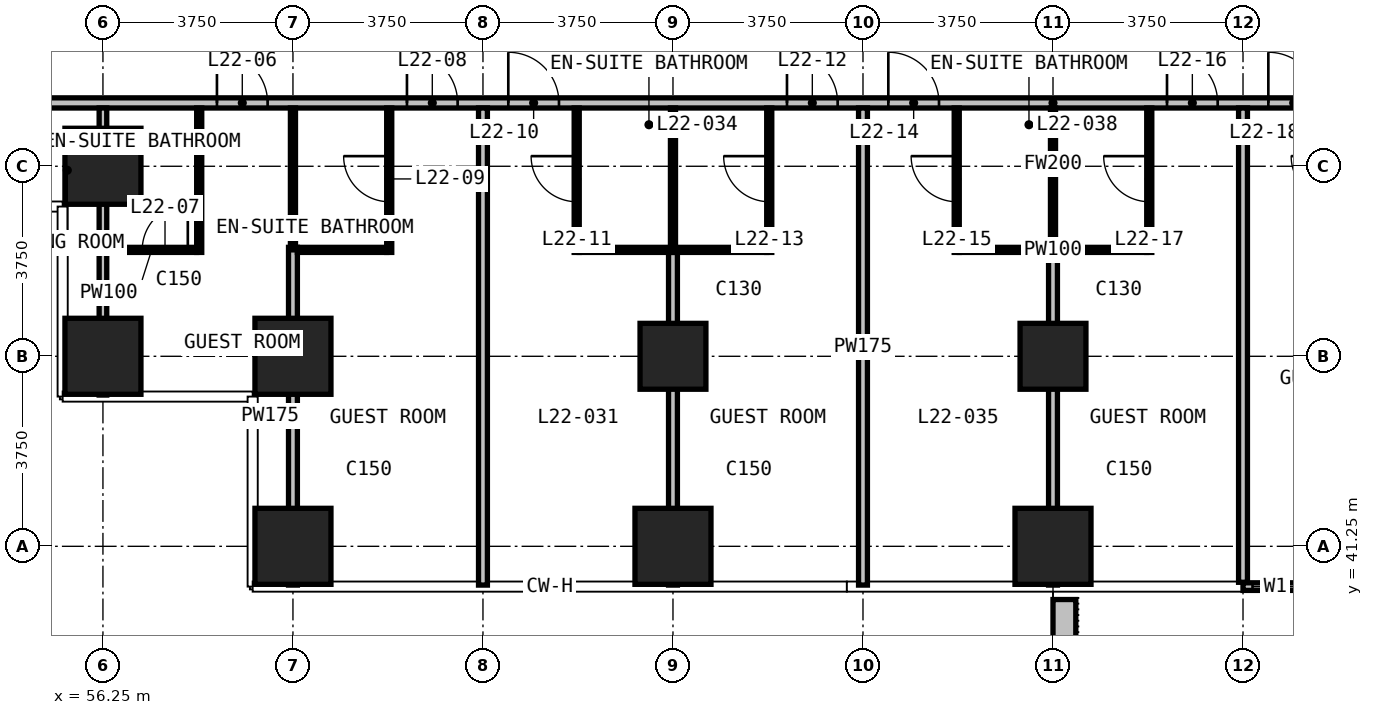
"""IFC4 building model, lengths in metres.
Left out: names, types, materials, properties, quantities, classifications, styles, units other than length and angle.
Written with IfcOpenShell. Run it as: python <this file> out.ifc"""

import sys

from ifc_helpers import new_model, si_unit, direction, frame, frame_2d, origin, origin_2d, place, context, subcontext, project, spatial, rectangle, extrude, element, fill, save


model = new_model("IFC4")
c1 = context("Model", 3, precision=1e-05, world=origin(), true_north=direction((0.0, 1.0)))
c2 = subcontext(c1, "Body", "Model", "MODEL_VIEW")
j1 = project(units=[si_unit("LENGTHUNIT", "METRE"), si_unit("PLANEANGLEUNIT", "RADIAN")], contexts=[c1])
p1 = place(None, origin())
s1 = spatial("IfcSite", under=j1, at=p1, CompositionType="ELEMENT")
p2 = place(p1, origin())
s2 = spatial("IfcBuilding", under=s1, at=p2, CompositionType="ELEMENT")
p3 = place(p2, frame((0.0, 0.0, 92.3)))
s3 = spatial("IfcBuildingStorey", under=s2, at=p3, CompositionType="ELEMENT", Elevation=92.3)
for number, where, z_axis, x_axis in (
    (1, (56.25, 45.0, 0.0), (0.0, 0.0, 1.0), (1.0, 0.0, 0.0)),
    (2, (56.25, 48.75, 0.0), (0.0, 0.0, 1.0), (1.0, 0.0, 0.0)),
    (3, (60.0, 41.25, 0.0), (0.0, 0.0, 1.0), (1.0, 0.0, 0.0)),
    (4, (60.0, 45.0, 0.0), (0.0, 0.0, 1.0), (1.0, 0.0, 0.0)),
    (5, (67.5, 41.25, 0.0), (0.0, 0.0, 1.0), (1.0, 0.0, 0.0)),
):
    element("IfcColumn", number, at=place(p3, frame(where, z_axis=z_axis, x_axis=x_axis)), inside=s3, PredefinedType="COLUMN", context=c2, shape_type="SweptSolid", body=[
        extrude(rectangle(XDim=1.5, YDim=1.5, at=origin_2d()), origin(), (0.0, 0.0, 1.0), 3.3),
    ])
p4 = place(p3, frame((67.5, 45.0, 0.0), z_axis=(0.0, 0.0, 1.0), x_axis=(1.0, 0.0, 0.0)))
e6 = element("IfcColumn", 6, at=p4, inside=s3, PredefinedType="COLUMN", context=c2, shape_type="SweptSolid", body=[
    extrude(rectangle(XDim=1.3, YDim=1.3, at=origin_2d()), origin(), (0.0, 0.0, 1.0), 3.3),
])
p5 = place(p3, frame((75.0, 41.25, 0.0), z_axis=(0.0, 0.0, 1.0), x_axis=(1.0, 0.0, 0.0)))
e7 = element("IfcColumn", 7, at=p5, inside=s3, PredefinedType="COLUMN", context=c2, shape_type="SweptSolid", body=[
    extrude(rectangle(XDim=1.5, YDim=1.5, at=origin_2d()), origin(), (0.0, 0.0, 1.0), 3.3),
])
p6 = place(p3, frame((75.0, 45.0, 0.0), z_axis=(0.0, 0.0, 1.0), x_axis=(1.0, 0.0, 0.0)))
e8 = element("IfcColumn", 8, at=p6, inside=s3, PredefinedType="COLUMN", context=c2, shape_type="SweptSolid", body=[
    extrude(rectangle(XDim=1.3, YDim=1.3, at=origin_2d()), origin(), (0.0, 0.0, 1.0), 3.3),
])
p7 = place(p3, frame((78.75, 40.455, 0.0), z_axis=(0.0, 0.0, 1.0), x_axis=(1.0, 0.0, 0.0)))
e9 = element("IfcWall", 9, at=p7, inside=s3, PredefinedType="SOLIDWALL", context=c2, shape_type="SweptSolid", body=[
    extrude(rectangle(XDim=3.75, YDim=0.15, at=frame_2d((1.875, 0.0))), origin(), (0.0, 0.0, 1.0), 3.0),
])
p8 = place(p7, frame((0.188, 0.0, 0.1)))
e10 = element("IfcOpeningElement", 10, at=p8, cuts=e9, PredefinedType="OPENING", context=c2, shape_type="SweptSolid", body=[
    extrude(rectangle(XDim=0.9, YDim=2.4, at=frame_2d((0.45, 1.2))), frame((0.0, 0.085, 0.0), z_axis=(0.0, -1.0, 0.0), x_axis=(1.0, 0.0, 0.0)), (0.0, 0.0, 1.0), 0.17),
])
p9 = place(p7, frame((1.275, 0.0, 0.0)))
e11 = element("IfcOpeningElement", 11, at=p9, cuts=e9, PredefinedType="OPENING", context=c2, shape_type="SweptSolid", body=[
    extrude(rectangle(XDim=1.2, YDim=2.4, at=frame_2d((0.6, 1.2))), frame((0.0, 0.085, 0.0), z_axis=(0.0, -1.0, 0.0), x_axis=(1.0, 0.0, 0.0)), (0.0, 0.0, 1.0), 0.17),
])
p10 = place(p3, frame((75.225, 40.2, 0.0), z_axis=(0.0, 0.0, 1.0), x_axis=(0.0, -1.0, 0.0)))
e12 = element("IfcWall", 12, at=p10, inside=s3, PredefinedType="USERDEFINED", context=c2, shape_type="SweptSolid", body=[
    extrude(rectangle(XDim=2.35, YDim=0.45, at=frame_2d((1.175, 0.0))), origin(), (0.0, 0.0, 1.0), 1.1),
])
p11 = place(p3, frame((51.735, 50.0, 0.0), z_axis=(0.0, 0.0, 1.0), x_axis=(1.0, 0.0, 0.0)))
e13 = element("IfcWall", 13, at=p11, inside=s3, PredefinedType="PARTITIONING", context=c2, shape_type="SweptSolid", body=[
    extrude(rectangle(XDim=46.53, YDim=0.2, at=frame_2d((23.265, 0.0))), origin(), (0.0, 0.0, 1.0), 3.0),
])
p12 = place(p11, frame((6.765, 0.0, 0.0)))
e14 = element("IfcOpeningElement", 14, at=p12, cuts=e13, PredefinedType="OPENING", context=c2, shape_type="SweptSolid", body=[
    extrude(rectangle(XDim=1.0, YDim=2.2, at=frame_2d((0.5, 1.1))), frame((0.0, 0.11, 0.0), z_axis=(0.0, -1.0, 0.0), x_axis=(1.0, 0.0, 0.0)), (0.0, 0.0, 1.0), 0.22),
])
p13 = place(p11, frame((10.515, 0.0, 0.0)))
e15 = element("IfcOpeningElement", 15, at=p13, cuts=e13, PredefinedType="OPENING", context=c2, shape_type="SweptSolid", body=[
    extrude(rectangle(XDim=1.0, YDim=2.2, at=frame_2d((0.5, 1.1))), frame((0.0, 0.11, 0.0), z_axis=(0.0, -1.0, 0.0), x_axis=(1.0, 0.0, 0.0)), (0.0, 0.0, 1.0), 0.22),
])
p14 = place(p11, frame((12.515, 0.0, 0.0)))
e16 = element("IfcOpeningElement", 16, at=p14, cuts=e13, PredefinedType="OPENING", context=c2, shape_type="SweptSolid", body=[
    extrude(rectangle(XDim=1.0, YDim=2.2, at=frame_2d((0.5, 1.1))), frame((0.0, 0.11, 0.0), z_axis=(0.0, -1.0, 0.0), x_axis=(1.0, 0.0, 0.0)), (0.0, 0.0, 1.0), 0.22),
])
p15 = place(p11, frame((18.015, 0.0, 0.0)))
e17 = element("IfcOpeningElement", 17, at=p15, cuts=e13, PredefinedType="OPENING", context=c2, shape_type="SweptSolid", body=[
    extrude(rectangle(XDim=1.0, YDim=2.2, at=frame_2d((0.5, 1.1))), frame((0.0, 0.11, 0.0), z_axis=(0.0, -1.0, 0.0), x_axis=(1.0, 0.0, 0.0)), (0.0, 0.0, 1.0), 0.22),
])
p16 = place(p11, frame((20.015, 0.0, 0.0)))
e18 = element("IfcOpeningElement", 18, at=p16, cuts=e13, PredefinedType="OPENING", context=c2, shape_type="SweptSolid", body=[
    extrude(rectangle(XDim=1.0, YDim=2.2, at=frame_2d((0.5, 1.1))), frame((0.0, 0.11, 0.0), z_axis=(0.0, -1.0, 0.0), x_axis=(1.0, 0.0, 0.0)), (0.0, 0.0, 1.0), 0.22),
])
p17 = place(p11, frame((25.515, 0.0, 0.0)))
e19 = element("IfcOpeningElement", 19, at=p17, cuts=e13, PredefinedType="OPENING", context=c2, shape_type="SweptSolid", body=[
    extrude(rectangle(XDim=1.0, YDim=2.2, at=frame_2d((0.5, 1.1))), frame((0.0, 0.11, 0.0), z_axis=(0.0, -1.0, 0.0), x_axis=(1.0, 0.0, 0.0)), (0.0, 0.0, 1.0), 0.22),
])
p18 = place(p11, frame((27.515, 0.0, 0.0)))
e20 = element("IfcOpeningElement", 20, at=p18, cuts=e13, PredefinedType="OPENING", context=c2, shape_type="SweptSolid", body=[
    extrude(rectangle(XDim=1.0, YDim=2.2, at=frame_2d((0.5, 1.1))), frame((0.0, 0.11, 0.0), z_axis=(0.0, -1.0, 0.0), x_axis=(1.0, 0.0, 0.0)), (0.0, 0.0, 1.0), 0.22),
])
p19 = place(p11, frame((33.015, 0.0, 0.0)))
e21 = element("IfcOpeningElement", 21, at=p19, cuts=e13, PredefinedType="OPENING", context=c2, shape_type="SweptSolid", body=[
    extrude(rectangle(XDim=1.0, YDim=2.2, at=frame_2d((0.5, 1.1))), frame((0.0, 0.11, 0.0), z_axis=(0.0, -1.0, 0.0), x_axis=(1.0, 0.0, 0.0)), (0.0, 0.0, 1.0), 0.22),
])
p20 = place(p11, frame((35.015, 0.0, 0.0)))
e22 = element("IfcOpeningElement", 22, at=p20, cuts=e13, PredefinedType="OPENING", context=c2, shape_type="SweptSolid", body=[
    extrude(rectangle(XDim=1.0, YDim=2.2, at=frame_2d((0.5, 1.1))), frame((0.0, 0.11, 0.0), z_axis=(0.0, -1.0, 0.0), x_axis=(1.0, 0.0, 0.0)), (0.0, 0.0, 1.0), 0.22),
])
p21 = place(p11, frame((38.765, 0.0, 0.0)))
e23 = element("IfcOpeningElement", 23, at=p21, cuts=e13, PredefinedType="OPENING", context=c2, shape_type="SweptSolid", body=[
    extrude(rectangle(XDim=1.0, YDim=2.2, at=frame_2d((0.5, 1.1))), frame((0.0, 0.11, 0.0), z_axis=(0.0, -1.0, 0.0), x_axis=(1.0, 0.0, 0.0)), (0.0, 0.0, 1.0), 0.22),
])
p22 = place(p11, frame((1.8, 0.0, 0.0)))
e24 = element("IfcOpeningElement", 24, at=p22, cuts=e13, PredefinedType="OPENING", context=c2, shape_type="SweptSolid", body=[
    extrude(rectangle(XDim=0.9, YDim=2.2, at=frame_2d((0.45, 1.1))), frame((0.0, 0.11, 0.0), z_axis=(0.0, -1.0, 0.0), x_axis=(1.0, 0.0, 0.0)), (0.0, 0.0, 1.0), 0.22),
])
p23 = place(p11, frame((43.815, 0.0, 0.0)))
e25 = element("IfcOpeningElement", 25, at=p23, cuts=e13, PredefinedType="OPENING", context=c2, shape_type="SweptSolid", body=[
    extrude(rectangle(XDim=0.9, YDim=2.2, at=frame_2d((0.45, 1.1))), frame((0.0, 0.11, 0.0), z_axis=(0.0, -1.0, 0.0), x_axis=(1.0, 0.0, 0.0)), (0.0, 0.0, 1.0), 0.22),
])
p24 = place(p3, frame((60.0, 40.485, 0.0), z_axis=(0.0, 0.0, 1.0), x_axis=(0.0, 1.0, 0.0)))
e26 = element("IfcWall", 26, at=p24, inside=s3, PredefinedType="PARTITIONING", context=c2, shape_type="SweptSolid", body=[
    extrude(rectangle(XDim=6.665, YDim=0.175, at=frame_2d((3.333, 0.0))), origin(), (0.0, 0.0, 1.0), 3.0),
])
p25 = place(p3, frame((63.75, 40.485, 0.0), z_axis=(0.0, 0.0, 1.0), x_axis=(0.0, 1.0, 0.0)))
e27 = element("IfcWall", 27, at=p25, inside=s3, PredefinedType="PARTITIONING", context=c2, shape_type="SweptSolid", body=[
    extrude(rectangle(XDim=9.415, YDim=0.175, at=frame_2d((4.708, 0.0))), origin(), (0.0, 0.0, 1.0), 3.0),
])
p26 = place(p3, frame((67.5, 40.485, 0.0), z_axis=(0.0, 0.0, 1.0), x_axis=(0.0, 1.0, 0.0)))
e28 = element("IfcWall", 28, at=p26, inside=s3, PredefinedType="PARTITIONING", context=c2, shape_type="SweptSolid", body=[
    extrude(rectangle(XDim=6.565, YDim=0.175, at=frame_2d((3.282, 0.0))), origin(), (0.0, 0.0, 1.0), 3.0),
])
p27 = place(p3, frame((71.25, 40.485, 0.0), z_axis=(0.0, 0.0, 1.0), x_axis=(0.0, 1.0, 0.0)))
e29 = element("IfcWall", 29, at=p27, inside=s3, PredefinedType="PARTITIONING", context=c2, shape_type="SweptSolid", body=[
    extrude(rectangle(XDim=9.415, YDim=0.175, at=frame_2d((4.708, 0.0))), origin(), (0.0, 0.0, 1.0), 3.0),
])
p28 = place(p3, frame((75.0, 40.485, 0.0), z_axis=(0.0, 0.0, 1.0), x_axis=(0.0, 1.0, 0.0)))
e30 = element("IfcWall", 30, at=p28, inside=s3, PredefinedType="PARTITIONING", context=c2, shape_type="SweptSolid", body=[
    extrude(rectangle(XDim=6.565, YDim=0.175, at=frame_2d((3.282, 0.0))), origin(), (0.0, 0.0, 1.0), 3.0),
])
p29 = place(p3, frame((78.75, 40.54, 0.0), z_axis=(0.0, 0.0, 1.0), x_axis=(0.0, 1.0, 0.0)))
e31 = element("IfcWall", 31, at=p29, inside=s3, PredefinedType="PARTITIONING", context=c2, shape_type="SweptSolid", body=[
    extrude(rectangle(XDim=9.36, YDim=0.175, at=frame_2d((4.68, 0.0))), origin(), (0.0, 0.0, 1.0), 3.0),
])
p30 = place(p3, frame((56.25, 44.235, 0.0), z_axis=(0.0, 0.0, 1.0), x_axis=(0.0, 1.0, 0.0)))
e32 = element("IfcWall", 32, at=p30, inside=s3, PredefinedType="PARTITIONING", context=c2, shape_type="SweptSolid", body=[
    extrude(rectangle(XDim=5.665, YDim=0.15, at=frame_2d((2.833, 0.0))), origin(), (0.0, 0.0, 1.0), 3.0),
])
p31 = place(p3, frame((56.325, 47.1, 0.0), z_axis=(0.0, 0.0, 1.0), x_axis=(1.0, 0.0, 0.0)))
e33 = element("IfcWall", 33, at=p31, inside=s3, PredefinedType="PARTITIONING", context=c2, shape_type="SweptSolid", body=[
    extrude(rectangle(XDim=1.775, YDim=0.1, at=frame_2d((0.888, 0.0))), origin(), (0.0, 0.0, 1.0), 3.0),
])
p32 = place(p31, frame((0.7, 0.0, 0.0)))
e34 = element("IfcOpeningElement", 34, at=p32, cuts=e33, PredefinedType="OPENING", context=c2, shape_type="SweptSolid", body=[
    extrude(rectangle(XDim=0.9, YDim=2.2, at=frame_2d((0.45, 1.1))), frame((0.0, 0.06, 0.0), z_axis=(0.0, -1.0, 0.0), x_axis=(1.0, 0.0, 0.0)), (0.0, 0.0, 1.0), 0.12),
])
p33 = place(p3, frame((60.088, 47.1, 0.0), z_axis=(0.0, 0.0, 1.0), x_axis=(1.0, 0.0, 0.0)))
e35 = element("IfcWall", 35, at=p33, inside=s3, PredefinedType="PARTITIONING", context=c2, shape_type="SweptSolid", body=[
    extrude(rectangle(XDim=1.762, YDim=0.1, at=frame_2d((0.881, 0.0))), origin(), (0.0, 0.0, 1.0), 3.0),
])
for number, where, z_axis, x_axis in (
    (36, (65.65, 47.1, 0.0), (0.0, 0.0, 1.0), (1.0, 0.0, 0.0)),
    (37, (73.15, 47.1, 0.0), (0.0, 0.0, 1.0), (1.0, 0.0, 0.0)),
):
    element("IfcWall", number, at=place(p3, frame(where, z_axis=z_axis, x_axis=x_axis)), inside=s3, PredefinedType="PARTITIONING", context=c2, shape_type="SweptSolid", body=[
        extrude(rectangle(XDim=3.7, YDim=0.1, at=frame_2d((1.85, 0.0))), origin(), (0.0, 0.0, 1.0), 3.0),
    ])
p34 = place(p3, frame((58.15, 47.05, 0.0), z_axis=(0.0, 0.0, 1.0), x_axis=(0.0, 1.0, 0.0)))
e38 = element("IfcWall", 38, at=p34, inside=s3, PredefinedType="PARTITIONING", context=c2, shape_type="SweptSolid", body=[
    extrude(rectangle(XDim=2.85, YDim=0.1, at=frame_2d((1.425, 0.0))), origin(), (0.0, 0.0, 1.0), 3.0),
])
p35 = place(p3, frame((60.0, 47.1, 0.0), z_axis=(0.0, 0.0, 1.0), x_axis=(0.0, 1.0, 0.0)))
e39 = element("IfcWall", 39, at=p35, inside=s3, PredefinedType="PARTITIONING", context=c2, shape_type="SweptSolid", body=[
    extrude(rectangle(XDim=2.8, YDim=0.1, at=frame_2d((1.4, 0.0))), origin(), (0.0, 0.0, 1.0), 3.0),
])
p36 = place(p3, frame((61.9, 47.05, 0.0), z_axis=(0.0, 0.0, 1.0), x_axis=(0.0, 1.0, 0.0)))
e40 = element("IfcWall", 40, at=p36, inside=s3, PredefinedType="PARTITIONING", context=c2, shape_type="SweptSolid", body=[
    extrude(rectangle(XDim=2.85, YDim=0.1, at=frame_2d((1.425, 0.0))), origin(), (0.0, 0.0, 1.0), 3.0),
])
p37 = place(p36, frame((1.0, 0.0, 0.0)))
e41 = element("IfcOpeningElement", 41, at=p37, cuts=e40, PredefinedType="OPENING", context=c2, shape_type="SweptSolid", body=[
    extrude(rectangle(XDim=0.9, YDim=2.2, at=frame_2d((0.45, 1.1))), frame((0.0, 0.06, 0.0), z_axis=(0.0, -1.0, 0.0), x_axis=(1.0, 0.0, 0.0)), (0.0, 0.0, 1.0), 0.12),
])
p38 = place(p3, frame((65.6, 47.05, 0.0), z_axis=(0.0, 0.0, 1.0), x_axis=(0.0, 1.0, 0.0)))
e42 = element("IfcWall", 42, at=p38, inside=s3, PredefinedType="PARTITIONING", context=c2, shape_type="SweptSolid", body=[
    extrude(rectangle(XDim=2.85, YDim=0.1, at=frame_2d((1.425, 0.0))), origin(), (0.0, 0.0, 1.0), 3.0),
])
p39 = place(p38, frame((1.0, 0.0, 0.0)))
e43 = element("IfcOpeningElement", 43, at=p39, cuts=e42, PredefinedType="OPENING", context=c2, shape_type="SweptSolid", body=[
    extrude(rectangle(XDim=0.9, YDim=2.2, at=frame_2d((0.45, 1.1))), frame((0.0, 0.06, 0.0), z_axis=(0.0, -1.0, 0.0), x_axis=(1.0, 0.0, 0.0)), (0.0, 0.0, 1.0), 0.12),
])
p40 = place(p3, frame((67.5, 47.15, 0.0), z_axis=(0.0, 0.0, 1.0), x_axis=(0.0, 1.0, 0.0)))
e44 = element("IfcWall", 44, at=p40, inside=s3, PredefinedType="PARTITIONING", context=c2, shape_type="SweptSolid", body=[
    extrude(rectangle(XDim=2.75, YDim=0.1, at=frame_2d((1.375, 0.0))), origin(), (0.0, 0.0, 1.0), 3.0),
])
p41 = place(p3, frame((69.4, 47.05, 0.0), z_axis=(0.0, 0.0, 1.0), x_axis=(0.0, 1.0, 0.0)))
e45 = element("IfcWall", 45, at=p41, inside=s3, PredefinedType="PARTITIONING", context=c2, shape_type="SweptSolid", body=[
    extrude(rectangle(XDim=2.85, YDim=0.1, at=frame_2d((1.425, 0.0))), origin(), (0.0, 0.0, 1.0), 3.0),
])
p42 = place(p41, frame((1.0, 0.0, 0.0)))
e46 = element("IfcOpeningElement", 46, at=p42, cuts=e45, PredefinedType="OPENING", context=c2, shape_type="SweptSolid", body=[
    extrude(rectangle(XDim=0.9, YDim=2.2, at=frame_2d((0.45, 1.1))), frame((0.0, 0.06, 0.0), z_axis=(0.0, -1.0, 0.0), x_axis=(1.0, 0.0, 0.0)), (0.0, 0.0, 1.0), 0.12),
])
p43 = place(p3, frame((73.1, 47.05, 0.0), z_axis=(0.0, 0.0, 1.0), x_axis=(0.0, 1.0, 0.0)))
e47 = element("IfcWall", 47, at=p43, inside=s3, PredefinedType="PARTITIONING", context=c2, shape_type="SweptSolid", body=[
    extrude(rectangle(XDim=2.85, YDim=0.1, at=frame_2d((1.425, 0.0))), origin(), (0.0, 0.0, 1.0), 3.0),
])
p44 = place(p43, frame((1.0, 0.0, 0.0)))
e48 = element("IfcOpeningElement", 48, at=p44, cuts=e47, PredefinedType="OPENING", context=c2, shape_type="SweptSolid", body=[
    extrude(rectangle(XDim=0.9, YDim=2.2, at=frame_2d((0.45, 1.1))), frame((0.0, 0.06, 0.0), z_axis=(0.0, -1.0, 0.0), x_axis=(1.0, 0.0, 0.0)), (0.0, 0.0, 1.0), 0.12),
])
p45 = place(p3, frame((75.0, 47.15, 0.0), z_axis=(0.0, 0.0, 1.0), x_axis=(0.0, 1.0, 0.0)))
e49 = element("IfcWall", 49, at=p45, inside=s3, PredefinedType="PARTITIONING", context=c2, shape_type="SweptSolid", body=[
    extrude(rectangle(XDim=2.75, YDim=0.1, at=frame_2d((1.375, 0.0))), origin(), (0.0, 0.0, 1.0), 3.0),
])
p46 = place(p3, frame((76.9, 47.05, 0.0), z_axis=(0.0, 0.0, 1.0), x_axis=(0.0, 1.0, 0.0)))
e50 = element("IfcWall", 50, at=p46, inside=s3, PredefinedType="PARTITIONING", context=c2, shape_type="SweptSolid", body=[
    extrude(rectangle(XDim=2.85, YDim=0.1, at=frame_2d((1.425, 0.0))), origin(), (0.0, 0.0, 1.0), 3.0),
])
p47 = place(p46, frame((1.0, 0.0, 0.0)))
e51 = element("IfcOpeningElement", 51, at=p47, cuts=e50, PredefinedType="OPENING", context=c2, shape_type="SweptSolid", body=[
    extrude(rectangle(XDim=0.9, YDim=2.2, at=frame_2d((0.45, 1.1))), frame((0.0, 0.06, 0.0), z_axis=(0.0, -1.0, 0.0), x_axis=(1.0, 0.0, 0.0)), (0.0, 0.0, 1.0), 0.12),
])
p48 = place(p8, origin())
e52 = element("IfcWindow", 52, at=p48, inside=s3, PartitioningType="SINGLE_PANEL", PredefinedType="WINDOW", context=c2, shape_type="SweptSolid", body=[
    extrude(rectangle(XDim=0.9, YDim=2.4, at=frame_2d((0.45, 1.2))), frame((0.0, 0.03, 0.0), z_axis=(0.0, -1.0, 0.0), x_axis=(1.0, 0.0, 0.0)), (0.0, 0.0, 1.0), 0.06),
])
fill(e10, e52)
p49 = place(p12, origin())
e53 = element("IfcDoor", 53, at=p49, inside=s3, OperationType="SINGLE_SWING_RIGHT", PredefinedType="DOOR", context=c2, shape_type="SweptSolid", body=[
    extrude(rectangle(XDim=1.0, YDim=2.2, at=frame_2d((0.5, 1.1))), frame((0.0, 0.025, 0.0), z_axis=(0.0, -1.0, 0.0), x_axis=(1.0, 0.0, 0.0)), (0.0, 0.0, 1.0), 0.05),
])
fill(e14, e53)
p50 = place(p32, origin())
e54 = element("IfcDoor", 54, at=p50, inside=s3, OperationType="SINGLE_SWING_RIGHT", PredefinedType="DOOR", context=c2, shape_type="SweptSolid", body=[
    extrude(rectangle(XDim=0.9, YDim=2.2, at=frame_2d((0.45, 1.1))), frame((0.0, 0.025, 0.0), z_axis=(0.0, -1.0, 0.0), x_axis=(1.0, 0.0, 0.0)), (0.0, 0.0, 1.0), 0.05),
])
fill(e34, e54)
p51 = place(p13, origin())
e55 = element("IfcDoor", 55, at=p51, inside=s3, OperationType="SINGLE_SWING_RIGHT", PredefinedType="DOOR", context=c2, shape_type="SweptSolid", body=[
    extrude(rectangle(XDim=1.0, YDim=2.2, at=frame_2d((0.5, 1.1))), frame((0.0, 0.025, 0.0), z_axis=(0.0, -1.0, 0.0), x_axis=(1.0, 0.0, 0.0)), (0.0, 0.0, 1.0), 0.05),
])
fill(e15, e55)
p52 = place(p37, origin())
e56 = element("IfcDoor", 56, at=p52, inside=s3, OperationType="SINGLE_SWING_RIGHT", PredefinedType="DOOR", context=c2, shape_type="SweptSolid", body=[
    extrude(rectangle(XDim=0.9, YDim=2.2, at=frame_2d((0.45, 1.1))), frame((0.0, 0.025, 0.0), z_axis=(0.0, -1.0, 0.0), x_axis=(1.0, 0.0, 0.0)), (0.0, 0.0, 1.0), 0.05),
])
fill(e41, e56)
p53 = place(p14, origin())
e57 = element("IfcDoor", 57, at=p53, inside=s3, OperationType="SINGLE_SWING_RIGHT", PredefinedType="DOOR", context=c2, shape_type="SweptSolid", body=[
    extrude(rectangle(XDim=1.0, YDim=2.2, at=frame_2d((0.5, 1.1))), frame((0.0, 0.025, 0.0), z_axis=(0.0, -1.0, 0.0), x_axis=(1.0, 0.0, 0.0)), (0.0, 0.0, 1.0), 0.05),
])
fill(e16, e57)
p54 = place(p39, origin())
e58 = element("IfcDoor", 58, at=p54, inside=s3, OperationType="SINGLE_SWING_RIGHT", PredefinedType="DOOR", context=c2, shape_type="SweptSolid", body=[
    extrude(rectangle(XDim=0.9, YDim=2.2, at=frame_2d((0.45, 1.1))), frame((0.0, 0.025, 0.0), z_axis=(0.0, -1.0, 0.0), x_axis=(1.0, 0.0, 0.0)), (0.0, 0.0, 1.0), 0.05),
])
fill(e43, e58)
p55 = place(p15, origin())
e59 = element("IfcDoor", 59, at=p55, inside=s3, OperationType="SINGLE_SWING_LEFT", PredefinedType="DOOR", context=c2, shape_type="SweptSolid", body=[
    extrude(rectangle(XDim=1.0, YDim=2.2, at=frame_2d((0.5, 1.1))), frame((0.0, 0.025, 0.0), z_axis=(0.0, -1.0, 0.0), x_axis=(1.0, 0.0, 0.0)), (0.0, 0.0, 1.0), 0.05),
])
fill(e17, e59)
p56 = place(p42, origin())
e60 = element("IfcDoor", 60, at=p56, inside=s3, OperationType="SINGLE_SWING_RIGHT", PredefinedType="DOOR", context=c2, shape_type="SweptSolid", body=[
    extrude(rectangle(XDim=0.9, YDim=2.2, at=frame_2d((0.45, 1.1))), frame((0.0, 0.025, 0.0), z_axis=(0.0, -1.0, 0.0), x_axis=(1.0, 0.0, 0.0)), (0.0, 0.0, 1.0), 0.05),
])
fill(e46, e60)
p57 = place(p16, origin())
e61 = element("IfcDoor", 61, at=p57, inside=s3, OperationType="SINGLE_SWING_RIGHT", PredefinedType="DOOR", context=c2, shape_type="SweptSolid", body=[
    extrude(rectangle(XDim=1.0, YDim=2.2, at=frame_2d((0.5, 1.1))), frame((0.0, 0.025, 0.0), z_axis=(0.0, -1.0, 0.0), x_axis=(1.0, 0.0, 0.0)), (0.0, 0.0, 1.0), 0.05),
])
fill(e18, e61)
p58 = place(p44, origin())
e62 = element("IfcDoor", 62, at=p58, inside=s3, OperationType="SINGLE_SWING_RIGHT", PredefinedType="DOOR", context=c2, shape_type="SweptSolid", body=[
    extrude(rectangle(XDim=0.9, YDim=2.2, at=frame_2d((0.45, 1.1))), frame((0.0, 0.025, 0.0), z_axis=(0.0, -1.0, 0.0), x_axis=(1.0, 0.0, 0.0)), (0.0, 0.0, 1.0), 0.05),
])
fill(e48, e62)
p59 = place(p17, origin())
e63 = element("IfcDoor", 63, at=p59, inside=s3, OperationType="SINGLE_SWING_LEFT", PredefinedType="DOOR", context=c2, shape_type="SweptSolid", body=[
    extrude(rectangle(XDim=1.0, YDim=2.2, at=frame_2d((0.5, 1.1))), frame((0.0, 0.025, 0.0), z_axis=(0.0, -1.0, 0.0), x_axis=(1.0, 0.0, 0.0)), (0.0, 0.0, 1.0), 0.05),
])
fill(e19, e63)
p60 = place(p47, origin())
e64 = element("IfcDoor", 64, at=p60, inside=s3, OperationType="SINGLE_SWING_RIGHT", PredefinedType="DOOR", context=c2, shape_type="SweptSolid", body=[
    extrude(rectangle(XDim=0.9, YDim=2.2, at=frame_2d((0.45, 1.1))), frame((0.0, 0.025, 0.0), z_axis=(0.0, -1.0, 0.0), x_axis=(1.0, 0.0, 0.0)), (0.0, 0.0, 1.0), 0.05),
])
fill(e51, e64)
p61 = place(p18, origin())
e65 = element("IfcDoor", 65, at=p61, inside=s3, OperationType="SINGLE_SWING_LEFT", PredefinedType="DOOR", context=c2, shape_type="SweptSolid", body=[
    extrude(rectangle(XDim=1.0, YDim=2.2, at=frame_2d((0.5, 1.1))), frame((0.0, 0.025, 0.0), z_axis=(0.0, -1.0, 0.0), x_axis=(1.0, 0.0, 0.0)), (0.0, 0.0, 1.0), 0.05),
])
fill(e20, e65)
save(model, sys.argv[1])
